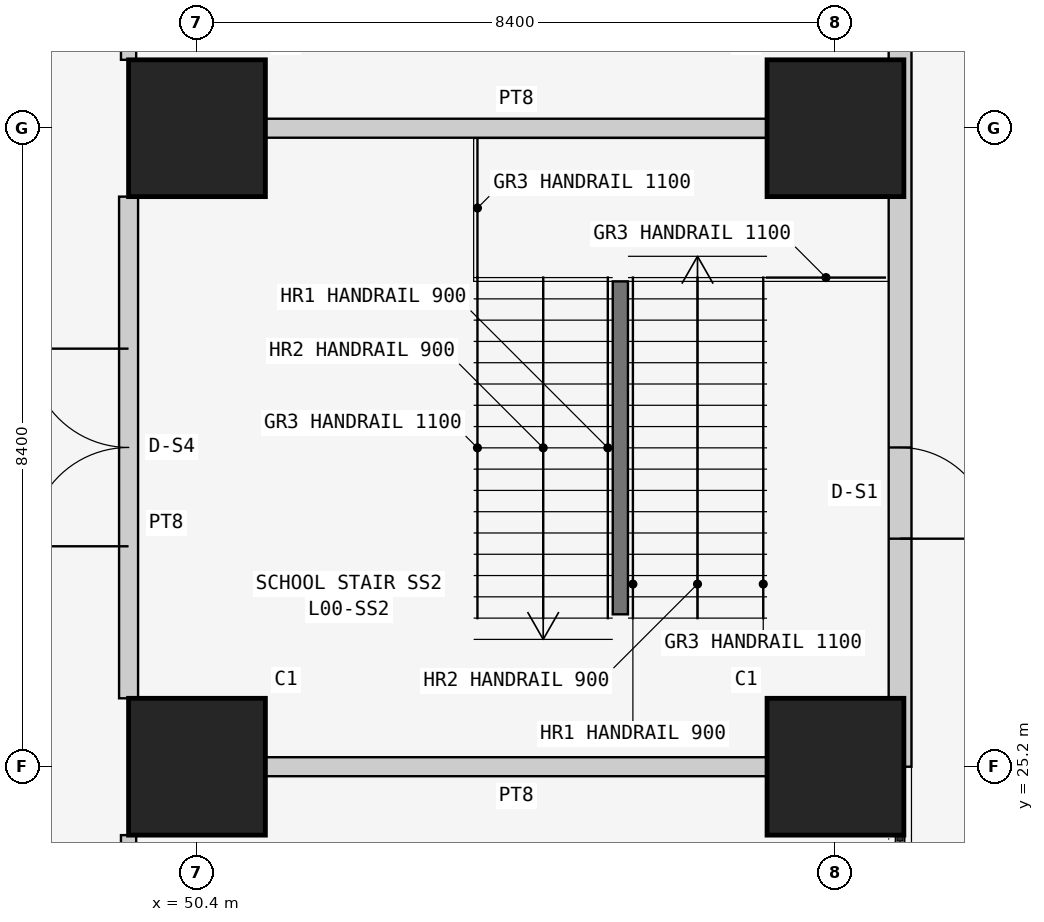
"""IFC4 building model, lengths in metres.
Left out: names, types, materials, properties, quantities, classifications, styles, units other than length and angle.
Written with IfcOpenShell. Run it as: python <this file> out.ifc"""

import sys

from ifc_helpers import new_model, si_unit, direction, frame, frame_2d, origin, origin_2d, place, context, subcontext, project, spatial, rectangle, extrude, element, fill, save


model = new_model("IFC4")
c1 = context("Model", 3, precision=1e-05, world=origin(), true_north=direction((0.0, 1.0)))
c2 = subcontext(c1, "Body", "Model", "MODEL_VIEW")
j1 = project(units=[si_unit("LENGTHUNIT", "METRE"), si_unit("PLANEANGLEUNIT", "RADIAN")], contexts=[c1])
p1 = place(None, origin())
s1 = spatial("IfcSite", under=j1, at=p1, CompositionType="ELEMENT")
p2 = place(p1, origin())
s2 = spatial("IfcBuilding", under=s1, at=p2, CompositionType="ELEMENT")
p3 = place(p2, origin())
s3 = spatial("IfcBuildingStorey", under=s2, at=p3, CompositionType="ELEMENT", Elevation=0.0)
for number, where, z_axis, x_axis in (
    (1, (50.4, 25.2, 0.0), (0.0, 0.0, 1.0), (1.0, 0.0, 0.0)),
    (2, (50.4, 33.6, 0.0), (0.0, 0.0, 1.0), (1.0, 0.0, 0.0)),
    (3, (58.8, 25.2, 0.0), (0.0, 0.0, 1.0), (1.0, 0.0, 0.0)),
    (4, (58.8, 33.6, 0.0), (0.0, 0.0, 1.0), (1.0, 0.0, 0.0)),
):
    element("IfcColumn", number, at=place(p3, frame(where, z_axis=z_axis, x_axis=x_axis)), inside=s3, PredefinedType="COLUMN", context=c2, shape_type="SweptSolid", body=[
        extrude(rectangle(XDim=1.8, YDim=1.8, at=origin_2d()), origin(), (0.0, 0.0, 1.0), 6.0),
    ])
p4 = place(p3, frame((59.65, 25.2, 0.0), z_axis=(0.0, 0.0, 1.0), x_axis=(0.0, 1.0, 0.0)))
e5 = element("IfcWall", 5, at=p4, inside=s3, PredefinedType="SOLIDWALL", context=c2, shape_type="SweptSolid", body=[
    extrude(rectangle(XDim=33.2, YDim=0.3, at=frame_2d((16.6, 0.0))), origin(), (0.0, 0.0, 1.0), 5.8),
])
p5 = place(p4, frame((3.0, 0.0, 0.0)))
e6 = element("IfcOpeningElement", 6, at=p5, cuts=e5, PredefinedType="OPENING", context=c2, shape_type="SweptSolid", body=[
    extrude(rectangle(XDim=1.2, YDim=2.4, at=frame_2d((0.6, 1.2))), frame((0.0, 0.16, 0.0), z_axis=(0.0, -1.0, 0.0), x_axis=(1.0, 0.0, 0.0)), (0.0, 0.0, 1.0), 0.32),
])
p6 = place(p4, frame((20.4, 0.0, 0.0)))
e7 = element("IfcOpeningElement", 7, at=p6, cuts=e5, PredefinedType="OPENING", context=c2, shape_type="SweptSolid", body=[
    extrude(rectangle(XDim=1.2, YDim=2.4, at=frame_2d((0.6, 1.2))), frame((0.0, 0.16, 0.0), z_axis=(0.0, -1.0, 0.0), x_axis=(1.0, 0.0, 0.0)), (0.0, 0.0, 1.0), 0.32),
])
p7 = place(p4, frame((30.2, 0.0, 0.0)))
e8 = element("IfcOpeningElement", 8, at=p7, cuts=e5, PredefinedType="OPENING", context=c2, shape_type="SweptSolid", body=[
    extrude(rectangle(XDim=1.8, YDim=2.4, at=frame_2d((0.9, 1.2))), frame((0.0, 0.16, 0.0), z_axis=(0.0, -1.0, 0.0), x_axis=(1.0, 0.0, 0.0)), (0.0, 0.0, 1.0), 0.32),
])
for number, where, z_axis, x_axis in (
    (9, (57.9, 25.2, 0.0), (0.0, 0.0, 1.0), (-1.0, 0.0, 0.0)),
    (10, (51.3, 33.6, 0.0), (0.0, 0.0, 1.0), (1.0, 0.0, 0.0)),
):
    element("IfcWall", number, at=place(p3, frame(where, z_axis=z_axis, x_axis=x_axis)), inside=s3, PredefinedType="SOLIDWALL", context=c2, shape_type="SweptSolid", body=[
        extrude(rectangle(XDim=6.6, YDim=0.25, at=frame_2d((3.3, 0.0))), origin(), (0.0, 0.0, 1.0), 5.043),
    ])
p8 = place(p3, frame((49.5, 26.1, 0.0), z_axis=(0.0, 0.0, 1.0), x_axis=(0.0, 1.0, 0.0)))
e11 = element("IfcWall", 11, at=p8, inside=s3, PredefinedType="SOLIDWALL", context=c2, shape_type="SweptSolid", body=[
    extrude(rectangle(XDim=6.6, YDim=0.25, at=frame_2d((3.3, 0.0))), origin(), (0.0, 0.0, 1.0), 5.8),
])
p9 = place(p8, frame((2.0, 0.0, 0.0)))
e12 = element("IfcOpeningElement", 12, at=p9, cuts=e11, PredefinedType="OPENING", context=c2, shape_type="SweptSolid", body=[
    extrude(rectangle(XDim=2.6, YDim=2.4, at=frame_2d((1.3, 1.2))), frame((0.0, 0.135, 0.0), z_axis=(0.0, -1.0, 0.0), x_axis=(1.0, 0.0, 0.0)), (0.0, 0.0, 1.0), 0.27),
])
p10 = place(p3, frame((49.5, 17.7, 0.0), z_axis=(0.0, 0.0, 1.0), x_axis=(0.0, 1.0, 0.0)))
e13 = element("IfcWall", 13, at=p10, inside=s3, PredefinedType="PARTITIONING", context=c2, shape_type="SweptSolid", body=[
    extrude(rectangle(XDim=6.6, YDim=0.2, at=frame_2d((3.3, 0.0))), origin(), (0.0, 0.0, 1.0), 5.8),
])
p11 = place(p10, frame((2.8, 0.0, 0.0)))
e14 = element("IfcOpeningElement", 14, at=p11, cuts=e13, PredefinedType="OPENING", context=c2, shape_type="SweptSolid", body=[
    extrude(rectangle(XDim=1.0, YDim=2.1, at=frame_2d((0.5, 1.05))), frame((0.0, 0.11, 0.0), z_axis=(0.0, -1.0, 0.0), x_axis=(1.0, 0.0, 0.0)), (0.0, 0.0, 1.0), 0.22),
])
p12 = place(p3, frame((49.5, 34.5, 0.0), z_axis=(0.0, 0.0, 1.0), x_axis=(0.0, 1.0, 0.0)))
e15 = element("IfcWall", 15, at=p12, inside=s3, PredefinedType="PARTITIONING", context=c2, shape_type="SweptSolid", body=[
    extrude(rectangle(XDim=6.6, YDim=0.2, at=frame_2d((3.3, 0.0))), origin(), (0.0, 0.0, 1.0), 5.8),
])
p13 = place(p12, frame((2.8, 0.0, 0.0)))
e16 = element("IfcOpeningElement", 16, at=p13, cuts=e15, PredefinedType="OPENING", context=c2, shape_type="SweptSolid", body=[
    extrude(rectangle(XDim=1.0, YDim=2.1, at=frame_2d((0.5, 1.05))), frame((0.0, 0.11, 0.0), z_axis=(0.0, -1.0, 0.0), x_axis=(1.0, 0.0, 0.0)), (0.0, 0.0, 1.0), 0.22),
])
p14 = place(p3, frame((55.97, 27.205, 0.0), z_axis=(0.0, 0.0, 1.0), x_axis=(0.0, 1.0, 0.0)))
e17 = element("IfcWall", 17, at=p14, inside=s3, PredefinedType="SOLIDWALL", context=c2, shape_type="SweptSolid", body=[
    extrude(rectangle(XDim=4.38, YDim=0.2, at=frame_2d((2.19, 0.0))), origin(), (0.0, 0.0, 1.0), 6.0),
])
p15 = place(p5, frame((1.2, 0.0, 0.0), z_axis=(0.0, 0.0, 1.0), x_axis=(-1.0, 0.0, 0.0)))
e18 = element("IfcDoor", 18, at=p15, inside=s3, OperationType="SINGLE_SWING_RIGHT", PredefinedType="DOOR", context=c2, shape_type="SweptSolid", body=[
    extrude(rectangle(XDim=1.2, YDim=2.4, at=frame_2d((0.6, 1.2))), frame((0.0, 0.025, 0.0), z_axis=(0.0, -1.0, 0.0), x_axis=(1.0, 0.0, 0.0)), (0.0, 0.0, 1.0), 0.05),
])
fill(e6, e18)
p16 = place(p9, origin())
e19 = element("IfcDoor", 19, at=p16, inside=s3, OperationType="DOUBLE_DOOR_SINGLE_SWING", PredefinedType="DOOR", context=c2, shape_type="SweptSolid", body=[
    extrude(rectangle(XDim=2.6, YDim=2.4, at=frame_2d((1.3, 1.2))), frame((0.0, 0.025, 0.0), z_axis=(0.0, -1.0, 0.0), x_axis=(1.0, 0.0, 0.0)), (0.0, 0.0, 1.0), 0.05),
])
fill(e12, e19)
save(model, sys.argv[1])
